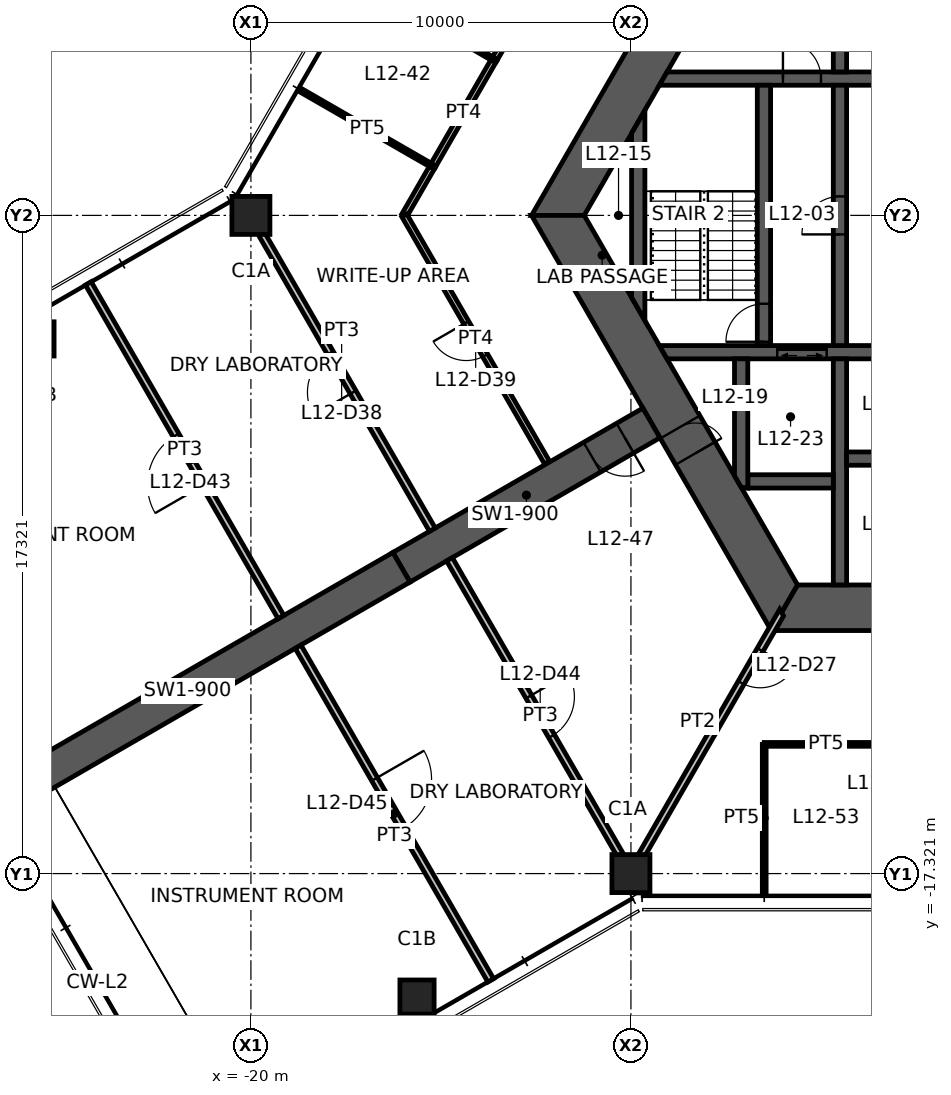
"""IFC4 building model, lengths in metres.
Left out: names, types, materials, properties, quantities, classifications, styles, units other than length and angle.
Written with IfcOpenShell. Run it as: python <this file> out.ifc"""

import sys

from ifc_helpers import new_model, si_unit, direction, frame, frame_2d, origin, origin_2d, place, context, subcontext, project, spatial, polyline, rectangle, hollow_rectangle, outline, extrude, element, fill, save


model = new_model("IFC4")
c1 = context("Model", 3, precision=1e-05, world=origin(), true_north=direction((0.0, 1.0)))
c2 = subcontext(c1, "Body", "Model", "MODEL_VIEW")
j1 = project(units=[si_unit("LENGTHUNIT", "METRE"), si_unit("PLANEANGLEUNIT", "RADIAN")], contexts=[c1])
p1 = place(None, origin())
s1 = spatial("IfcSite", under=j1, at=p1, CompositionType="ELEMENT")
p2 = place(p1, origin())
s2 = spatial("IfcBuilding", under=s1, at=p2, CompositionType="ELEMENT")
p3 = place(p2, frame((0.0, 0.0, 47.8)))
s3 = spatial("IfcBuildingStorey", under=s2, at=p3, CompositionType="ELEMENT", Elevation=47.8)
for number, where, z_axis, x_axis in (
    (1, (-20.0, 0.0, 0.0), (0.0, 0.0, 1.0), (1.0, 0.0, 0.0)),
    (2, (-10.0, -17.321, 0.0), (0.0, 0.0, 1.0), (1.0, 0.0, 0.0)),
):
    element("IfcColumn", number, at=place(p3, frame(where, z_axis=z_axis, x_axis=x_axis)), inside=s3, PredefinedType="COLUMN", context=c2, shape_type="SweptSolid", body=[
        extrude(hollow_rectangle(XDim=1.0, YDim=1.0, WallThickness=0.06, at=origin_2d()), origin(), (0.0, 0.0, 1.0), 4.2),
    ])
for number, where, z_axis, x_axis in (
    (3, (-25.629, -3.25, 0.0), (0.0, 0.0, 1.0), (1.0, 0.0, 0.0)),
    (4, (-15.629, -20.571, 0.0), (0.0, 0.0, 1.0), (1.0, 0.0, 0.0)),
):
    element("IfcColumn", number, at=place(p3, frame(where, z_axis=z_axis, x_axis=x_axis)), inside=s3, PredefinedType="COLUMN", context=c2, shape_type="SweptSolid", body=[
        extrude(hollow_rectangle(XDim=0.9, YDim=0.9, WallThickness=0.05, at=origin_2d()), origin(), (0.0, 0.0, 1.0), 4.2),
    ])
p4 = place(p3, frame((-5.961, 10.325, 0.0), z_axis=(0.0, 0.0, 1.0), x_axis=(-0.500004296715, -0.866022923061, 0.0)))
e5 = element("IfcWall", 5, at=p4, inside=s3, PredefinedType="SHEAR", context=c2, shape_type="SweptSolid", body=[
    extrude(outline(polyline([(-0.346, -0.6), (4.494, -0.6), (5.494, -0.6), (12.269, -0.6), (11.576, 0.6), (5.494, 0.6), (4.494, 0.6), (0.346, 0.6), (-0.346, -0.6)])), origin(), (0.0, 0.0, 1.0), 4.2),
])
p5 = place(p4, frame((4.494, 0.0, 0.0)))
e6 = element("IfcOpeningElement", 6, at=p5, cuts=e5, PredefinedType="OPENING", context=c2, shape_type="SweptSolid", body=[
    extrude(rectangle(XDim=1.0, YDim=2.1, at=frame_2d((0.5, 1.05))), frame((0.0, 0.61, 0.0), z_axis=(0.0, -1.0, 0.0), x_axis=(1.0, 0.0, 0.0)), (0.0, 0.0, 1.0), 1.22),
])
p6 = place(p3, frame((-11.922, 0.0, 0.0), z_axis=(0.0, 0.0, 1.0), x_axis=(0.500004296715, -0.866022923061, 0.0)))
e7 = element("IfcWall", 7, at=p6, inside=s3, PredefinedType="SHEAR", context=c2, shape_type="SweptSolid", body=[
    extrude(outline(polyline([(-0.346, -0.6), (6.431, -0.6), (7.231, -0.6), (12.269, -0.6), (11.576, 0.6), (7.231, 0.6), (6.431, 0.6), (0.346, 0.6), (-0.346, -0.6)])), origin(), (0.0, 0.0, 1.0), 4.2),
])
p7 = place(p6, frame((6.431, 0.0, 0.0)))
e8 = element("IfcOpeningElement", 8, at=p7, cuts=e7, PredefinedType="OPENING", context=c2, shape_type="SweptSolid", body=[
    extrude(rectangle(XDim=0.8, YDim=2.1, at=frame_2d((0.4, 1.05))), frame((0.0, 0.61, 0.0), z_axis=(0.0, -1.0, 0.0), x_axis=(1.0, 0.0, 0.0)), (0.0, 0.0, 1.0), 1.22),
])
p8 = place(p3, frame((-5.961, -10.325, 0.0), z_axis=(0.0, 0.0, 1.0), x_axis=(1.0, 0.0, 0.0)))
e9 = element("IfcWall", 9, at=p8, inside=s3, PredefinedType="SHEAR", context=c2, shape_type="SweptSolid", body=[
    extrude(outline(polyline([(-0.346, -0.6), (5.461, -0.6), (6.461, -0.6), (12.269, -0.6), (11.576, 0.6), (6.461, 0.6), (5.461, 0.6), (0.346, 0.6), (-0.346, -0.6)])), origin(), (0.0, 0.0, 1.0), 4.2),
])
p9 = place(p8, frame((5.461, 0.0, 0.0)))
e10 = element("IfcOpeningElement", 10, at=p9, cuts=e9, PredefinedType="OPENING", context=c2, shape_type="SweptSolid", body=[
    extrude(rectangle(XDim=1.0, YDim=2.1, at=frame_2d((0.5, 1.05))), frame((0.0, 0.61, 0.0), z_axis=(0.0, -1.0, 0.0), x_axis=(1.0, 0.0, 0.0)), (0.0, 0.0, 1.0), 1.22),
])
p10 = place(p3, frame((-9.461, -5.462, 0.0), z_axis=(0.0, 0.0, 1.0), x_axis=(-0.866019116917, -0.500010889016, 0.0)))
e11 = element("IfcWall", 11, at=p10, inside=s3, PredefinedType="SHEAR", context=c2, shape_type="SweptSolid", body=[
    extrude(rectangle(XDim=7.595, YDim=0.9, at=frame_2d((3.798, 0.0))), origin(), (0.0, 0.0, 1.0), 4.2),
])
p11 = place(p10, frame((0.8, 0.0, 0.0)))
e12 = element("IfcOpeningElement", 12, at=p11, cuts=e11, PredefinedType="OPENING", context=c2, shape_type="SweptSolid", body=[
    extrude(rectangle(XDim=1.0, YDim=2.1, at=frame_2d((0.5, 1.05))), frame((0.0, 0.46, 0.0), z_axis=(0.0, -1.0, 0.0), x_axis=(1.0, 0.0, 0.0)), (0.0, 0.0, 1.0), 0.92),
])
p12 = place(p3, frame((-16.039, -9.26, 0.0), z_axis=(0.0, 0.0, 1.0), x_axis=(-0.866024837091, -0.50000098154, 0.0)))
e13 = element("IfcWall", 13, at=p12, inside=s3, PredefinedType="SHEAR", context=c2, shape_type="SweptSolid", body=[
    extrude(rectangle(XDim=13.0, YDim=0.9, at=frame_2d((6.5, 0.0))), origin(), (0.0, 0.0, 1.0), 4.2),
])
p13 = place(p3, frame((-9.151, 3.6, 0.0), z_axis=(0.0, 0.0, 1.0), x_axis=(1.0, 0.0, 0.0)))
e14 = element("IfcWall", 14, at=p13, inside=s3, PredefinedType="SHEAR", context=c2, shape_type="SweptSolid", body=[
    extrude(outline(polyline([(-0.101, -0.175), (3.151, -0.175), (4.151, -0.175), (7.726, -0.175), (7.726, 0.175), (4.151, 0.175), (3.151, 0.175), (0.101, 0.175), (-0.101, -0.175)])), origin(), (0.0, 0.0, 1.0), 4.2),
])
p14 = place(p13, frame((3.151, 0.0, 0.0)))
e15 = element("IfcOpeningElement", 15, at=p14, cuts=e14, PredefinedType="OPENING", context=c2, shape_type="SweptSolid", body=[
    extrude(rectangle(XDim=1.0, YDim=2.1, at=frame_2d((0.5, 1.05))), frame((0.0, 0.185, 0.0), z_axis=(0.0, -1.0, 0.0), x_axis=(1.0, 0.0, 0.0)), (0.0, 0.0, 1.0), 0.37),
])
p15 = place(p3, frame((-9.151, -3.6, 0.0), z_axis=(0.0, 0.0, 1.0), x_axis=(1.0, 0.0, 0.0)))
e16 = element("IfcWall", 16, at=p15, inside=s3, PredefinedType="SHEAR", context=c2, shape_type="SweptSolid", body=[
    extrude(outline(polyline([(0.101, -0.175), (3.001, -0.175), (4.301, -0.175), (7.726, -0.175), (7.726, 0.175), (4.301, 0.175), (3.001, 0.175), (-0.101, 0.175), (0.101, -0.175)])), origin(), (0.0, 0.0, 1.0), 4.2),
])
p16 = place(p15, frame((3.001, 0.0, 0.0)))
e17 = element("IfcOpeningElement", 17, at=p16, cuts=e16, PredefinedType="OPENING", context=c2, shape_type="SweptSolid", body=[
    extrude(rectangle(XDim=1.3, YDim=2.1, at=frame_2d((0.65, 1.05))), frame((0.0, 0.185, 0.0), z_axis=(0.0, -1.0, 0.0), x_axis=(1.0, 0.0, 0.0)), (0.0, 0.0, 1.0), 0.37),
])
p17 = place(p3, frame((-4.5, -3.425, 0.0), z_axis=(0.0, 0.0, 1.0), x_axis=(0.0, 1.0, 0.0)))
e18 = element("IfcWall", 18, at=p17, inside=s3, PredefinedType="SHEAR", context=c2, shape_type="SweptSolid", body=[
    extrude(rectangle(XDim=6.85, YDim=0.35, at=frame_2d((3.425, 0.0))), origin(), (0.0, 0.0, 1.0), 4.2),
])
p18 = place(p17, frame((2.925, 0.0, 0.0)))
e19 = element("IfcOpeningElement", 19, at=p18, cuts=e18, PredefinedType="OPENING", context=c2, shape_type="SweptSolid", body=[
    extrude(rectangle(XDim=1.0, YDim=2.1, at=frame_2d((0.5, 1.05))), frame((0.0, 0.185, 0.0), z_axis=(0.0, -1.0, 0.0), x_axis=(1.0, 0.0, 0.0)), (0.0, 0.0, 1.0), 0.37),
])
p19 = place(p3, frame((-6.5, -3.425, 0.0), z_axis=(0.0, 0.0, 1.0), x_axis=(0.0, 1.0, 0.0)))
e20 = element("IfcWall", 20, at=p19, inside=s3, PredefinedType="SHEAR", context=c2, shape_type="SweptSolid", body=[
    extrude(rectangle(XDim=6.85, YDim=0.35, at=frame_2d((3.425, 0.0))), origin(), (0.0, 0.0, 1.0), 4.2),
])
p20 = place(p19, frame((0.1, 0.0, 0.0)))
e21 = element("IfcOpeningElement", 21, at=p20, cuts=e20, PredefinedType="OPENING", context=c2, shape_type="SweptSolid", body=[
    extrude(rectangle(XDim=1.0, YDim=2.1, at=frame_2d((0.5, 1.05))), frame((0.0, 0.185, 0.0), z_axis=(0.0, -1.0, 0.0), x_axis=(1.0, 0.0, 0.0)), (0.0, 0.0, 1.0), 0.37),
])
for number, where, z_axis, x_axis in (
    (22, (-4.5, 3.775, 0.0), (0.0, 0.0, 1.0), (0.0, 1.0, 0.0)),
    (23, (-4.5, -3.775, 0.0), (0.0, 0.0, 1.0), (0.0, -1.0, 0.0)),
):
    element("IfcWall", number, at=place(p3, frame(where, z_axis=z_axis, x_axis=x_axis)), inside=s3, PredefinedType="SHEAR", context=c2, shape_type="SweptSolid", body=[
        extrude(rectangle(XDim=5.95, YDim=0.35, at=frame_2d((2.975, 0.0))), origin(), (0.0, 0.0, 1.0), 4.2),
    ])
p21 = place(p3, frame((-4.325, -6.4, 0.0), z_axis=(0.0, 0.0, 1.0), x_axis=(1.0, 0.0, 0.0)))
e24 = element("IfcWall", 24, at=p21, inside=s3, PredefinedType="SHEAR", context=c2, shape_type="SweptSolid", body=[
    extrude(rectangle(XDim=2.55, YDim=0.35, at=frame_2d((1.275, 0.0))), origin(), (0.0, 0.0, 1.0), 4.2),
])
p22 = place(p3, frame((-6.925, -7.0, 0.0), z_axis=(0.0, 0.0, 1.0), x_axis=(1.0, 0.0, 0.0)))
e25 = element("IfcWall", 25, at=p22, inside=s3, PredefinedType="SHEAR", context=c2, shape_type="SweptSolid", body=[
    extrude(rectangle(XDim=2.25, YDim=0.35, at=frame_2d((1.125, 0.0))), origin(), (0.0, 0.0, 1.0), 4.2),
])
p23 = place(p3, frame((-7.1, -3.775, 0.0), z_axis=(0.0, 0.0, 1.0), x_axis=(0.0, -1.0, 0.0)))
e26 = element("IfcWall", 26, at=p23, inside=s3, PredefinedType="SHEAR", context=c2, shape_type="SweptSolid", body=[
    extrude(outline(polyline([(0.0, -0.175), (3.074, -0.175), (3.377, 0.0), (3.4, 0.175), (0.0, 0.175), (0.0, -0.175)])), origin(), (0.0, 0.0, 1.0), 4.2),
])
p24 = place(p3, frame((-9.808, -2.462, 0.0), z_axis=(0.0, 0.0, 1.0), x_axis=(0.0, 1.0, 0.0)))
e27 = element("IfcWall", 27, at=p24, inside=s3, PredefinedType="SHEAR", context=c2, shape_type="SweptSolid", body=[
    extrude(outline(polyline([(-0.303, -0.175), (5.228, -0.175), (4.621, 0.175), (0.303, 0.175), (-0.303, -0.175)])), origin(), (0.0, 0.0, 1.0), 4.2),
])
p25 = place(p3, frame((-6.035, -10.453, 0.0), z_axis=(0.0, 0.0, 1.0), x_axis=(-0.499993402427, -0.866029212861, 0.0)))
e28 = element("IfcWall", 28, at=p25, inside=s3, PredefinedType="PARTITIONING", context=c2, shape_type="SweptSolid", body=[
    extrude(outline(polyline([(-0.051, -0.087), (1.129, -0.087), (2.129, -0.087), (7.93, -0.087), (7.93, 0.087), (2.129, 0.087), (1.129, 0.087), (0.051, 0.087), (-0.051, -0.087)])), origin(), (0.0, 0.0, 1.0), 3.05),
])
p26 = place(p25, frame((1.129, 0.0, 0.0)))
e29 = element("IfcOpeningElement", 29, at=p26, cuts=e28, PredefinedType="OPENING", context=c2, shape_type="SweptSolid", body=[
    extrude(rectangle(XDim=1.0, YDim=2.1, at=frame_2d((0.5, 1.05))), frame((0.0, 0.098, 0.0), z_axis=(0.0, -1.0, 0.0), x_axis=(1.0, 0.0, 0.0)), (0.0, 0.0, 1.0), 0.195),
])
p27 = place(p3, frame((-15.225, -8.271, 0.0), z_axis=(0.0, 0.0, 1.0), x_axis=(-0.499993908199, 0.866028920859, 0.0)))
e30 = element("IfcWall", 30, at=p27, inside=s3, PredefinedType="PARTITIONING", context=c2, shape_type="SweptSolid", body=[
    extrude(rectangle(XDim=9.55, YDim=0.175, at=frame_2d((4.775, 0.0))), origin(), (0.0, 0.0, 1.0), 2.95),
])
p28 = place(p27, frame((4.175, 0.0, 0.0)))
e31 = element("IfcOpeningElement", 31, at=p28, cuts=e30, PredefinedType="OPENING", context=c2, shape_type="SweptSolid", body=[
    extrude(rectangle(XDim=1.2, YDim=2.1, at=frame_2d((0.6, 1.05))), frame((0.0, 0.098, 0.0), z_axis=(0.0, -1.0, 0.0), x_axis=(1.0, 0.0, 0.0)), (0.0, 0.0, 1.0), 0.195),
])
p29 = place(p3, frame((-15.222, 1.285, 0.0), z_axis=(0.0, 0.0, 1.0), x_axis=(0.499969057507, 0.866043267704, 0.0)))
e32 = element("IfcWall", 32, at=p29, inside=s3, PredefinedType="PARTITIONING", context=c2, shape_type="SweptSolid", body=[
    extrude(rectangle(XDim=3.257, YDim=0.15, at=frame_2d((1.628, 0.0))), origin(), (0.0, 0.0, 1.0), 2.65),
])
p30 = place(p3, frame((-15.964, 0.0, 0.0), z_axis=(0.0, 0.0, 1.0), x_axis=(0.499901701094, 0.866082149246, 0.0)))
e33 = element("IfcWall", 33, at=p30, inside=s3, PredefinedType="PARTITIONING", context=c2, shape_type="SweptSolid", body=[
    extrude(rectangle(XDim=1.493, YDim=0.15, at=frame_2d((0.747, 0.0))), origin(), (0.0, 0.0, 1.0), 2.65),
])
p31 = place(p3, frame((-12.208, -6.506, 0.0), z_axis=(0.0, 0.0, 1.0), x_axis=(-0.499984092097, 0.866034588021, 0.0)))
e34 = element("IfcWall", 34, at=p31, inside=s3, PredefinedType="PARTITIONING", context=c2, shape_type="SweptSolid", body=[
    extrude(rectangle(XDim=7.512, YDim=0.15, at=frame_2d((3.756, 0.0))), origin(), (0.0, 0.0, 1.0), 2.65),
])
p32 = place(p31, frame((3.256, 0.0, 0.0)))
e35 = element("IfcOpeningElement", 35, at=p32, cuts=e34, PredefinedType="OPENING", context=c2, shape_type="SweptSolid", body=[
    extrude(rectangle(XDim=1.0, YDim=2.1, at=frame_2d((0.5, 1.05))), frame((0.0, 0.085, 0.0), z_axis=(0.0, -1.0, 0.0), x_axis=(1.0, 0.0, 0.0)), (0.0, 0.0, 1.0), 0.17),
])
p33 = place(p3, frame((-13.598, 4.097, 0.0), z_axis=(0.0, 0.0, 1.0), x_axis=(0.49998791073, 0.866032383415, 0.0)))
e36 = element("IfcWall", 36, at=p33, inside=s3, PredefinedType="PARTITIONING", context=c2, shape_type="SweptSolid", body=[
    extrude(rectangle(XDim=6.502, YDim=0.15, at=frame_2d((3.251, 0.0))), origin(), (0.0, 0.0, 1.0), 2.65),
])
p34 = place(p33, frame((2.751, 0.0, 0.0)))
e37 = element("IfcOpeningElement", 37, at=p34, cuts=e36, PredefinedType="OPENING", context=c2, shape_type="SweptSolid", body=[
    extrude(rectangle(XDim=1.0, YDim=2.1, at=frame_2d((0.5, 1.05))), frame((0.0, 0.085, 0.0), z_axis=(0.0, -1.0, 0.0), x_axis=(1.0, 0.0, 0.0)), (0.0, 0.0, 1.0), 0.17),
])
p35 = place(p3, frame((-15.217, 1.293, 0.0), z_axis=(0.0, 0.0, 1.0), x_axis=(-0.866583023507, 0.499032928142, 0.0)))
e38 = element("IfcWall", 38, at=p35, inside=s3, PredefinedType="PARTITIONING", context=c2, shape_type="SweptSolid", body=[
    extrude(rectangle(XDim=3.975, YDim=0.1, at=frame_2d((1.988, 0.0))), origin(), (0.0, 0.0, 1.0), 2.65),
])
p36 = place(p3, frame((-17.039, 6.089, 0.0), z_axis=(0.0, 0.0, 1.0), x_axis=(0.865455715078, -0.500985434159, 0.0)))
e39 = element("IfcWall", 39, at=p36, inside=s3, PredefinedType="PARTITIONING", context=c2, shape_type="SweptSolid", body=[
    extrude(rectangle(XDim=3.976, YDim=0.1, at=frame_2d((1.988, 0.0))), origin(), (0.0, 0.0, 1.0), 2.65),
])
p37 = place(p36, frame((2.776, 0.0, 0.0)))
e40 = element("IfcOpeningElement", 40, at=p37, cuts=e39, PredefinedType="OPENING", context=c2, shape_type="SweptSolid", body=[
    extrude(rectangle(XDim=0.9, YDim=2.1, at=frame_2d((0.45, 1.05))), frame((0.0, 0.06, 0.0), z_axis=(0.0, -1.0, 0.0), x_axis=(1.0, 0.0, 0.0)), (0.0, 0.0, 1.0), 0.12),
])
p38 = place(p3, frame((-19.209, -10.571, 0.0), z_axis=(0.0, 0.0, 1.0), x_axis=(-0.500005203629, 0.866022399447, 0.0)))
e41 = element("IfcWall", 41, at=p38, inside=s3, PredefinedType="PARTITIONING", context=c2, shape_type="SweptSolid", body=[
    extrude(rectangle(XDim=10.14, YDim=0.175, at=frame_2d((5.07, 0.0))), origin(), (0.0, 0.0, 1.0), 3.95),
])
p39 = place(p38, frame((4.025, 0.0, 0.0)))
e42 = element("IfcOpeningElement", 42, at=p39, cuts=e41, PredefinedType="OPENING", context=c2, shape_type="SweptSolid", body=[
    extrude(rectangle(XDim=1.5, YDim=2.1, at=frame_2d((0.75, 1.05))), frame((0.0, 0.098, 0.0), z_axis=(0.0, -1.0, 0.0), x_axis=(1.0, 0.0, 0.0)), (0.0, 0.0, 1.0), 0.195),
])
p40 = place(p3, frame((-14.775, -9.05, 0.0), z_axis=(0.0, 0.0, 1.0), x_axis=(0.499993908199, -0.866028920859, 0.0)))
e43 = element("IfcWall", 43, at=p40, inside=s3, PredefinedType="PARTITIONING", context=c2, shape_type="SweptSolid", body=[
    extrude(rectangle(XDim=9.55, YDim=0.175, at=frame_2d((4.775, 0.0))), origin(), (0.0, 0.0, 1.0), 2.95),
])
p41 = place(p40, frame((4.175, 0.0, 0.0)))
e44 = element("IfcOpeningElement", 44, at=p41, cuts=e43, PredefinedType="OPENING", context=c2, shape_type="SweptSolid", body=[
    extrude(rectangle(XDim=1.2, YDim=2.1, at=frame_2d((0.6, 1.05))), frame((0.0, 0.098, 0.0), z_axis=(0.0, -1.0, 0.0), x_axis=(1.0, 0.0, 0.0)), (0.0, 0.0, 1.0), 0.195),
])
p42 = place(p3, frame((-18.759, -11.35, 0.0), z_axis=(0.0, 0.0, 1.0), x_axis=(0.500005203629, -0.866022399447, 0.0)))
e45 = element("IfcWall", 45, at=p42, inside=s3, PredefinedType="PARTITIONING", context=c2, shape_type="SweptSolid", body=[
    extrude(rectangle(XDim=10.14, YDim=0.175, at=frame_2d((5.07, 0.0))), origin(), (0.0, 0.0, 1.0), 3.95),
])
p43 = place(p42, frame((4.025, 0.0, 0.0)))
e46 = element("IfcOpeningElement", 46, at=p43, cuts=e45, PredefinedType="OPENING", context=c2, shape_type="SweptSolid", body=[
    extrude(rectangle(XDim=1.5, YDim=2.1, at=frame_2d((0.75, 1.05))), frame((0.0, 0.098, 0.0), z_axis=(0.0, -1.0, 0.0), x_axis=(1.0, 0.0, 0.0)), (0.0, 0.0, 1.0), 0.195),
])
p44 = place(p3, frame((-6.493, -17.801, 0.0), z_axis=(0.0, 0.0, 1.0), x_axis=(0.0, 1.0, 0.0)))
e47 = element("IfcWall", 47, at=p44, inside=s3, PredefinedType="PARTITIONING", context=c2, shape_type="SweptSolid", body=[
    extrude(rectangle(XDim=3.88, YDim=0.1, at=frame_2d((1.94, 0.0))), origin(), (0.0, 0.0, 1.0), 2.65),
])
p45 = place(p3, frame((-6.493, -13.92, 0.0), z_axis=(0.0, 0.0, 1.0), x_axis=(1.0, 0.0, 0.0)))
e48 = element("IfcWall", 48, at=p45, inside=s3, PredefinedType="PARTITIONING", context=c2, shape_type="SweptSolid", body=[
    extrude(rectangle(XDim=3.247, YDim=0.1, at=frame_2d((1.623, 0.0))), origin(), (0.0, 0.0, 1.0), 2.65),
])
p46 = place(p7, origin())
e49 = element("IfcDoor", 49, at=p46, inside=s3, OperationType="SINGLE_SWING_RIGHT", PredefinedType="DOOR", context=c2, shape_type="SweptSolid", body=[
    extrude(rectangle(XDim=0.8, YDim=2.1, at=frame_2d((0.4, 1.05))), frame((0.0, 0.025, 0.0), z_axis=(0.0, -1.0, 0.0), x_axis=(1.0, 0.0, 0.0)), (0.0, 0.0, 1.0), 0.05),
])
fill(e8, e49)
p47 = place(p18, origin())
e50 = element("IfcDoor", 50, at=p47, inside=s3, OperationType="SINGLE_SWING_LEFT", PredefinedType="DOOR", context=c2, shape_type="SweptSolid", body=[
    extrude(rectangle(XDim=1.0, YDim=2.1, at=frame_2d((0.5, 1.05))), frame((0.0, 0.025, 0.0), z_axis=(0.0, -1.0, 0.0), x_axis=(1.0, 0.0, 0.0)), (0.0, 0.0, 1.0), 0.05),
])
fill(e19, e50)
p48 = place(p20, origin())
e51 = element("IfcDoor", 51, at=p48, inside=s3, OperationType="SINGLE_SWING_LEFT", PredefinedType="DOOR", context=c2, shape_type="SweptSolid", body=[
    extrude(rectangle(XDim=1.0, YDim=2.1, at=frame_2d((0.5, 1.05))), frame((0.0, 0.025, 0.0), z_axis=(0.0, -1.0, 0.0), x_axis=(1.0, 0.0, 0.0)), (0.0, 0.0, 1.0), 0.05),
])
fill(e21, e51)
p49 = place(p14, origin())
e52 = element("IfcDoor", 52, at=p49, inside=s3, OperationType="SINGLE_SWING_LEFT", PredefinedType="DOOR", context=c2, shape_type="SweptSolid", body=[
    extrude(rectangle(XDim=1.0, YDim=2.1, at=frame_2d((0.5, 1.05))), frame((0.0, 0.025, 0.0), z_axis=(0.0, -1.0, 0.0), x_axis=(1.0, 0.0, 0.0)), (0.0, 0.0, 1.0), 0.05),
])
fill(e15, e52)
p50 = place(p11, origin())
e53 = element("IfcDoor", 53, at=p50, inside=s3, OperationType="SINGLE_SWING_LEFT", PredefinedType="DOOR", context=c2, shape_type="SweptSolid", body=[
    extrude(rectangle(XDim=1.0, YDim=2.1, at=frame_2d((0.5, 1.05))), frame((0.0, 0.025, 0.0), z_axis=(0.0, -1.0, 0.0), x_axis=(1.0, 0.0, 0.0)), (0.0, 0.0, 1.0), 0.05),
])
fill(e12, e53)
p51 = place(p26, origin())
e54 = element("IfcDoor", 54, at=p51, inside=s3, OperationType="SINGLE_SWING_LEFT", PredefinedType="DOOR", context=c2, shape_type="SweptSolid", body=[
    extrude(rectangle(XDim=1.0, YDim=2.1, at=frame_2d((0.5, 1.05))), frame((0.0, 0.025, 0.0), z_axis=(0.0, -1.0, 0.0), x_axis=(1.0, 0.0, 0.0)), (0.0, 0.0, 1.0), 0.05),
])
fill(e29, e54)
p52 = place(p28, origin())
e55 = element("IfcDoor", 55, at=p52, inside=s3, OperationType="DOUBLE_DOOR_SINGLE_SWING", PredefinedType="DOOR", context=c2, shape_type="SweptSolid", body=[
    extrude(rectangle(XDim=1.2, YDim=2.1, at=frame_2d((0.6, 1.05))), frame((0.0, 0.025, 0.0), z_axis=(0.0, -1.0, 0.0), x_axis=(1.0, 0.0, 0.0)), (0.0, 0.0, 1.0), 0.05),
])
fill(e31, e55)
p53 = place(p32, origin())
e56 = element("IfcDoor", 56, at=p53, inside=s3, OperationType="SINGLE_SWING_RIGHT", PredefinedType="DOOR", context=c2, shape_type="SweptSolid", body=[
    extrude(rectangle(XDim=1.0, YDim=2.1, at=frame_2d((0.5, 1.05))), frame((0.0, 0.025, 0.0), z_axis=(0.0, -1.0, 0.0), x_axis=(1.0, 0.0, 0.0)), (0.0, 0.0, 1.0), 0.05),
])
fill(e35, e56)
p54 = place(p37, origin())
e57 = element("IfcDoor", 57, at=p54, inside=s3, OperationType="SINGLE_SWING_RIGHT", PredefinedType="DOOR", context=c2, shape_type="SweptSolid", body=[
    extrude(rectangle(XDim=0.9, YDim=2.1, at=frame_2d((0.45, 1.05))), frame((0.0, 0.025, 0.0), z_axis=(0.0, -1.0, 0.0), x_axis=(1.0, 0.0, 0.0)), (0.0, 0.0, 1.0), 0.05),
])
fill(e40, e57)
p55 = place(p39, origin())
e58 = element("IfcDoor", 58, at=p55, inside=s3, OperationType="DOUBLE_DOOR_SINGLE_SWING", PredefinedType="DOOR", context=c2, shape_type="SweptSolid", body=[
    extrude(rectangle(XDim=1.5, YDim=2.1, at=frame_2d((0.75, 1.05))), frame((0.0, 0.025, 0.0), z_axis=(0.0, -1.0, 0.0), x_axis=(1.0, 0.0, 0.0)), (0.0, 0.0, 1.0), 0.05),
])
fill(e42, e58)
p56 = place(p41, origin())
e59 = element("IfcDoor", 59, at=p56, inside=s3, OperationType="DOUBLE_DOOR_SINGLE_SWING", PredefinedType="DOOR", context=c2, shape_type="SweptSolid", body=[
    extrude(rectangle(XDim=1.2, YDim=2.1, at=frame_2d((0.6, 1.05))), frame((0.0, 0.025, 0.0), z_axis=(0.0, -1.0, 0.0), x_axis=(1.0, 0.0, 0.0)), (0.0, 0.0, 1.0), 0.05),
])
fill(e44, e59)
p57 = place(p43, origin())
e60 = element("IfcDoor", 60, at=p57, inside=s3, OperationType="DOUBLE_DOOR_SINGLE_SWING", PredefinedType="DOOR", context=c2, shape_type="SweptSolid", body=[
    extrude(rectangle(XDim=1.5, YDim=2.1, at=frame_2d((0.75, 1.05))), frame((0.0, 0.025, 0.0), z_axis=(0.0, -1.0, 0.0), x_axis=(1.0, 0.0, 0.0)), (0.0, 0.0, 1.0), 0.05),
])
fill(e46, e60)
p58 = place(p16, origin())
e61 = element("IfcDoor", 61, at=p58, inside=s3, OperationType="DOUBLE_DOOR_SLIDING", PredefinedType="DOOR", context=c2, shape_type="SweptSolid", body=[
    extrude(rectangle(XDim=1.3, YDim=2.1, at=frame_2d((0.65, 1.05))), frame((0.0, 0.025, 0.0), z_axis=(0.0, -1.0, 0.0), x_axis=(1.0, 0.0, 0.0)), (0.0, 0.0, 1.0), 0.05),
])
fill(e17, e61)
save(model, sys.argv[1])
